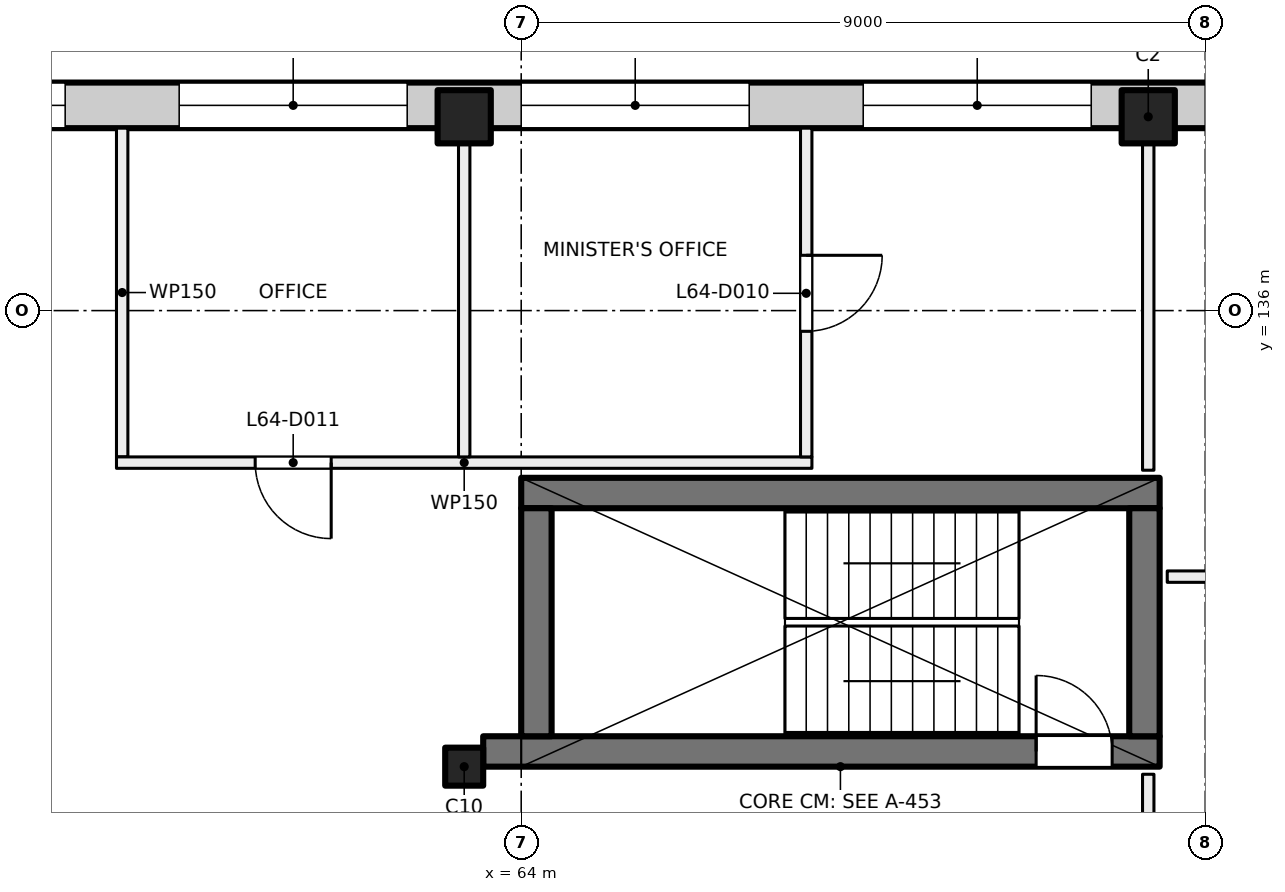
"""IFC4 building model, lengths in metres.
Left out: names, types, materials, properties, quantities, classifications, styles, units other than length and angle.
Written with IfcOpenShell. Run it as: python <this file> out.ifc"""

import sys

from ifc_helpers import new_model, si_unit, direction, frame, frame_2d, origin, origin_2d, place, context, subcontext, project, spatial, rectangle, extrude, element, fill, save


model = new_model("IFC4")
c1 = context("Model", 3, precision=1e-05, world=origin(), true_north=direction((0.0, 1.0)))
c2 = subcontext(c1, "Body", "Model", "MODEL_VIEW")
j1 = project(units=[si_unit("LENGTHUNIT", "METRE"), si_unit("PLANEANGLEUNIT", "RADIAN")], contexts=[c1])
p1 = place(None, origin())
s1 = spatial("IfcSite", under=j1, at=p1, CompositionType="ELEMENT")
p2 = place(p1, origin())
s2 = spatial("IfcBuilding", under=s1, at=p2, CompositionType="ELEMENT")
p3 = place(p2, frame((0.0, 0.0, 269.5)))
s3 = spatial("IfcBuildingStorey", under=s2, at=p3, CompositionType="ELEMENT", Elevation=269.5)
p4 = place(p3, frame((63.25, 130.0, 0.0), z_axis=(0.0, 0.0, 1.0), x_axis=(1.0, 0.0, 0.0)))
e1 = element("IfcColumn", 1, at=p4, inside=s3, PredefinedType="COLUMN", context=c2, shape_type="SweptSolid", body=[
    extrude(rectangle(XDim=0.5, YDim=0.5, at=origin_2d()), origin(), (0.0, 0.0, 1.0), 4.0),
])
for number, where, z_axis, x_axis in (
    (2, (63.25, 138.55, 0.0), (0.0, 0.0, 1.0), (1.0, 0.0, 0.0)),
    (3, (72.25, 138.55, 0.0), (0.0, 0.0, 1.0), (1.0, 0.0, 0.0)),
):
    element("IfcColumn", number, at=place(p3, frame(where, z_axis=z_axis, x_axis=x_axis)), inside=s3, PredefinedType="COLUMN", context=c2, shape_type="SweptSolid", body=[
        extrude(rectangle(XDim=0.7, YDim=0.7, at=origin_2d()), origin(), (0.0, 0.0, 1.0), 4.0),
    ])
p5 = place(p3, frame((63.5, 130.2, 0.0), z_axis=(0.0, 0.0, 1.0), x_axis=(1.0, 0.0, 0.0)))
e4 = element("IfcWall", 4, at=p5, inside=s3, PredefinedType="SHEAR", context=c2, shape_type="SweptSolid", body=[
    extrude(rectangle(XDim=8.9, YDim=0.4, at=frame_2d((4.45, 0.0))), origin(), (0.0, 0.0, 1.0), 4.0),
])
p6 = place(p5, frame((7.275, 0.0, 0.0)))
e5 = element("IfcOpeningElement", 5, at=p6, cuts=e4, PredefinedType="OPENING", context=c2, shape_type="SweptSolid", body=[
    extrude(rectangle(XDim=1.0, YDim=2.1, at=frame_2d((0.5, 1.05))), frame((0.0, 0.21, 0.0), z_axis=(0.0, -1.0, 0.0), x_axis=(1.0, 0.0, 0.0)), (0.0, 0.0, 1.0), 0.42),
])
p7 = place(p3, frame((64.0, 133.6, 0.0), z_axis=(0.0, 0.0, 1.0), x_axis=(1.0, 0.0, 0.0)))
e6 = element("IfcWall", 6, at=p7, inside=s3, PredefinedType="SHEAR", context=c2, shape_type="SweptSolid", body=[
    extrude(rectangle(XDim=8.4, YDim=0.4, at=frame_2d((4.2, 0.0))), origin(), (0.0, 0.0, 1.0), 4.0),
])
for number, where, z_axis, x_axis in (
    (7, (64.2, 130.4, 0.0), (0.0, 0.0, 1.0), (0.0, 1.0, 0.0)),
    (8, (72.2, 130.4, 0.0), (0.0, 0.0, 1.0), (0.0, 1.0, 0.0)),
):
    element("IfcWall", number, at=place(p3, frame(where, z_axis=z_axis, x_axis=x_axis)), inside=s3, PredefinedType="SHEAR", context=c2, shape_type="SweptSolid", body=[
        extrude(rectangle(XDim=3.0, YDim=0.4, at=frame_2d((1.5, 0.0))), origin(), (0.0, 0.0, 1.0), 4.0),
    ])
p8 = place(p3, frame((47.07, 138.7, 0.0), z_axis=(0.0, 0.0, 1.0), x_axis=(1.0, 0.0, 0.0)))
e9 = element("IfcWall", 9, at=p8, inside=s3, PredefinedType="SOLIDWALL", context=c2, shape_type="SweptSolid", body=[
    extrude(rectangle(XDim=43.91, YDim=0.6, at=frame_2d((21.955, 0.0))), origin(), (0.0, 0.0, 1.0), 3.625),
])
p9 = place(p8, frame((3.43, 0.0, 0.9)))
e10 = element("IfcOpeningElement", 10, at=p9, cuts=e9, PredefinedType="OPENING", context=c2, shape_type="SweptSolid", body=[
    extrude(rectangle(XDim=3.0, YDim=2.4, at=frame_2d((1.5, 1.2))), frame((0.0, 0.31, 0.0), z_axis=(0.0, -1.0, 0.0), x_axis=(1.0, 0.0, 0.0)), (0.0, 0.0, 1.0), 0.62),
])
p10 = place(p8, frame((7.93, 0.0, 0.9)))
e11 = element("IfcOpeningElement", 11, at=p10, cuts=e9, PredefinedType="OPENING", context=c2, shape_type="SweptSolid", body=[
    extrude(rectangle(XDim=3.0, YDim=2.4, at=frame_2d((1.5, 1.2))), frame((0.0, 0.31, 0.0), z_axis=(0.0, -1.0, 0.0), x_axis=(1.0, 0.0, 0.0)), (0.0, 0.0, 1.0), 0.62),
])
p11 = place(p8, frame((12.43, 0.0, 0.9)))
e12 = element("IfcOpeningElement", 12, at=p11, cuts=e9, PredefinedType="OPENING", context=c2, shape_type="SweptSolid", body=[
    extrude(rectangle(XDim=3.0, YDim=2.4, at=frame_2d((1.5, 1.2))), frame((0.0, 0.31, 0.0), z_axis=(0.0, -1.0, 0.0), x_axis=(1.0, 0.0, 0.0)), (0.0, 0.0, 1.0), 0.62),
])
p12 = place(p8, frame((16.93, 0.0, 0.9)))
e13 = element("IfcOpeningElement", 13, at=p12, cuts=e9, PredefinedType="OPENING", context=c2, shape_type="SweptSolid", body=[
    extrude(rectangle(XDim=3.0, YDim=2.4, at=frame_2d((1.5, 1.2))), frame((0.0, 0.31, 0.0), z_axis=(0.0, -1.0, 0.0), x_axis=(1.0, 0.0, 0.0)), (0.0, 0.0, 1.0), 0.62),
])
p13 = place(p8, frame((21.43, 0.0, 0.9)))
e14 = element("IfcOpeningElement", 14, at=p13, cuts=e9, PredefinedType="OPENING", context=c2, shape_type="SweptSolid", body=[
    extrude(rectangle(XDim=3.0, YDim=2.4, at=frame_2d((1.5, 1.2))), frame((0.0, 0.31, 0.0), z_axis=(0.0, -1.0, 0.0), x_axis=(1.0, 0.0, 0.0)), (0.0, 0.0, 1.0), 0.62),
])
p14 = place(p8, frame((25.93, 0.0, 0.9)))
e15 = element("IfcOpeningElement", 15, at=p14, cuts=e9, PredefinedType="OPENING", context=c2, shape_type="SweptSolid", body=[
    extrude(rectangle(XDim=3.0, YDim=2.4, at=frame_2d((1.5, 1.2))), frame((0.0, 0.31, 0.0), z_axis=(0.0, -1.0, 0.0), x_axis=(1.0, 0.0, 0.0)), (0.0, 0.0, 1.0), 0.62),
])
p15 = place(p8, frame((30.43, 0.0, 0.9)))
e16 = element("IfcOpeningElement", 16, at=p15, cuts=e9, PredefinedType="OPENING", context=c2, shape_type="SweptSolid", body=[
    extrude(rectangle(XDim=3.0, YDim=2.4, at=frame_2d((1.5, 1.2))), frame((0.0, 0.31, 0.0), z_axis=(0.0, -1.0, 0.0), x_axis=(1.0, 0.0, 0.0)), (0.0, 0.0, 1.0), 0.62),
])
p16 = place(p8, frame((34.93, 0.0, 0.9)))
e17 = element("IfcOpeningElement", 17, at=p16, cuts=e9, PredefinedType="OPENING", context=c2, shape_type="SweptSolid", body=[
    extrude(rectangle(XDim=3.0, YDim=2.4, at=frame_2d((1.5, 1.2))), frame((0.0, 0.31, 0.0), z_axis=(0.0, -1.0, 0.0), x_axis=(1.0, 0.0, 0.0)), (0.0, 0.0, 1.0), 0.62),
])
p17 = place(p8, frame((39.43, 0.0, 0.9)))
e18 = element("IfcOpeningElement", 18, at=p17, cuts=e9, PredefinedType="OPENING", context=c2, shape_type="SweptSolid", body=[
    extrude(rectangle(XDim=3.0, YDim=2.4, at=frame_2d((1.5, 1.2))), frame((0.0, 0.31, 0.0), z_axis=(0.0, -1.0, 0.0), x_axis=(1.0, 0.0, 0.0)), (0.0, 0.0, 1.0), 0.62),
])
p18 = place(p3, frame((58.75, 134.075, 0.0), z_axis=(0.0, 0.0, 1.0), x_axis=(0.0, 1.0, 0.0)))
e19 = element("IfcWall", 19, at=p18, inside=s3, PredefinedType="PARTITIONING", context=c2, shape_type="SweptSolid", body=[
    extrude(rectangle(XDim=4.325, YDim=0.15, at=frame_2d((2.163, 0.0))), origin(), (0.0, 0.0, 1.0), 3.625),
])
p19 = place(p3, frame((67.825, 134.0, 0.0), z_axis=(0.0, 0.0, 1.0), x_axis=(-1.0, 0.0, 0.0)))
e20 = element("IfcWall", 20, at=p19, inside=s3, PredefinedType="PARTITIONING", context=c2, shape_type="SweptSolid", body=[
    extrude(rectangle(XDim=9.15, YDim=0.15, at=frame_2d((4.575, 0.0))), origin(), (0.0, 0.0, 1.0), 3.625),
])
p20 = place(p19, frame((6.325, 0.0, 0.0)))
e21 = element("IfcOpeningElement", 21, at=p20, cuts=e20, PredefinedType="OPENING", context=c2, shape_type="SweptSolid", body=[
    extrude(rectangle(XDim=1.0, YDim=2.1, at=frame_2d((0.5, 1.05))), frame((0.0, 0.085, 0.0), z_axis=(0.0, -1.0, 0.0), x_axis=(1.0, 0.0, 0.0)), (0.0, 0.0, 1.0), 0.17),
])
p21 = place(p3, frame((63.25, 134.075, 0.0), z_axis=(0.0, 0.0, 1.0), x_axis=(0.0, 1.0, 0.0)))
e22 = element("IfcWall", 22, at=p21, inside=s3, PredefinedType="PARTITIONING", context=c2, shape_type="SweptSolid", body=[
    extrude(rectangle(XDim=4.325, YDim=0.15, at=frame_2d((2.163, 0.0))), origin(), (0.0, 0.0, 1.0), 3.625),
])
p22 = place(p3, frame((67.75, 138.4, 0.0), z_axis=(0.0, 0.0, 1.0), x_axis=(0.0, -1.0, 0.0)))
e23 = element("IfcWall", 23, at=p22, inside=s3, PredefinedType="PARTITIONING", context=c2, shape_type="SweptSolid", body=[
    extrude(rectangle(XDim=4.325, YDim=0.15, at=frame_2d((2.163, 0.0))), origin(), (0.0, 0.0, 1.0), 3.625),
])
p23 = place(p22, frame((1.673, 0.0, 0.0)))
e24 = element("IfcOpeningElement", 24, at=p23, cuts=e23, PredefinedType="OPENING", context=c2, shape_type="SweptSolid", body=[
    extrude(rectangle(XDim=1.0, YDim=2.1, at=frame_2d((0.5, 1.05))), frame((0.0, 0.085, 0.0), z_axis=(0.0, -1.0, 0.0), x_axis=(1.0, 0.0, 0.0)), (0.0, 0.0, 1.0), 0.17),
])
p24 = place(p3, frame((72.25, 126.0, 0.0), z_axis=(0.0, 0.0, 1.0), x_axis=(0.0, 1.0, 0.0)))
e25 = element("IfcWall", 25, at=p24, inside=s3, PredefinedType="PARTITIONING", context=c2, shape_type="SweptSolid", body=[
    extrude(rectangle(XDim=3.9, YDim=0.15, at=frame_2d((1.95, 0.0))), origin(), (0.0, 0.0, 1.0), 3.625),
])
p25 = place(p3, frame((72.25, 133.9, 0.0), z_axis=(0.0, 0.0, 1.0), x_axis=(0.0, 1.0, 0.0)))
e26 = element("IfcWall", 26, at=p25, inside=s3, PredefinedType="PARTITIONING", context=c2, shape_type="SweptSolid", body=[
    extrude(rectangle(XDim=4.5, YDim=0.15, at=frame_2d((2.25, 0.0))), origin(), (0.0, 0.0, 1.0), 3.625),
])
p26 = place(p3, frame((81.325, 132.5, 0.0), z_axis=(0.0, 0.0, 1.0), x_axis=(-1.0, 0.0, 0.0)))
e27 = element("IfcWall", 27, at=p26, inside=s3, PredefinedType="PARTITIONING", context=c2, shape_type="SweptSolid", body=[
    extrude(rectangle(XDim=8.825, YDim=0.15, at=frame_2d((4.413, 0.0))), origin(), (0.0, 0.0, 1.0), 3.625),
])
p27 = place(p26, frame((6.2, 0.0, 0.0)))
e28 = element("IfcOpeningElement", 28, at=p27, cuts=e27, PredefinedType="OPENING", context=c2, shape_type="SweptSolid", body=[
    extrude(rectangle(XDim=1.0, YDim=2.1, at=frame_2d((0.5, 1.05))), frame((0.0, 0.085, 0.0), z_axis=(0.0, -1.0, 0.0), x_axis=(1.0, 0.0, 0.0)), (0.0, 0.0, 1.0), 0.17),
])
p28 = place(p10, origin())
e29 = element("IfcWindow", 29, at=p28, inside=s3, PartitioningType="SINGLE_PANEL", PredefinedType="WINDOW", context=c2, shape_type="SweptSolid", body=[
    extrude(rectangle(XDim=3.0, YDim=2.4, at=frame_2d((1.5, 1.2))), frame((0.0, 0.03, 0.0), z_axis=(0.0, -1.0, 0.0), x_axis=(1.0, 0.0, 0.0)), (0.0, 0.0, 1.0), 0.06),
])
fill(e11, e29)
p29 = place(p11, origin())
e30 = element("IfcWindow", 30, at=p29, inside=s3, PartitioningType="SINGLE_PANEL", PredefinedType="WINDOW", context=c2, shape_type="SweptSolid", body=[
    extrude(rectangle(XDim=3.0, YDim=2.4, at=frame_2d((1.5, 1.2))), frame((0.0, 0.03, 0.0), z_axis=(0.0, -1.0, 0.0), x_axis=(1.0, 0.0, 0.0)), (0.0, 0.0, 1.0), 0.06),
])
fill(e12, e30)
p30 = place(p12, origin())
e31 = element("IfcWindow", 31, at=p30, inside=s3, PartitioningType="SINGLE_PANEL", PredefinedType="WINDOW", context=c2, shape_type="SweptSolid", body=[
    extrude(rectangle(XDim=3.0, YDim=2.4, at=frame_2d((1.5, 1.2))), frame((0.0, 0.03, 0.0), z_axis=(0.0, -1.0, 0.0), x_axis=(1.0, 0.0, 0.0)), (0.0, 0.0, 1.0), 0.06),
])
fill(e13, e31)
p31 = place(p13, origin())
e32 = element("IfcWindow", 32, at=p31, inside=s3, PartitioningType="SINGLE_PANEL", PredefinedType="WINDOW", context=c2, shape_type="SweptSolid", body=[
    extrude(rectangle(XDim=3.0, YDim=2.4, at=frame_2d((1.5, 1.2))), frame((0.0, 0.03, 0.0), z_axis=(0.0, -1.0, 0.0), x_axis=(1.0, 0.0, 0.0)), (0.0, 0.0, 1.0), 0.06),
])
fill(e14, e32)
p32 = place(p6, origin())
e33 = element("IfcDoor", 33, at=p32, inside=s3, OperationType="SINGLE_SWING_LEFT", PredefinedType="DOOR", context=c2, shape_type="SweptSolid", body=[
    extrude(rectangle(XDim=1.0, YDim=2.1, at=frame_2d((0.5, 1.05))), frame((0.0, 0.025, 0.0), z_axis=(0.0, -1.0, 0.0), x_axis=(1.0, 0.0, 0.0)), (0.0, 0.0, 1.0), 0.05),
])
fill(e5, e33)
p33 = place(p23, origin())
e34 = element("IfcDoor", 34, at=p33, inside=s3, OperationType="SINGLE_SWING_LEFT", PredefinedType="DOOR", context=c2, shape_type="SweptSolid", body=[
    extrude(rectangle(XDim=1.0, YDim=2.1, at=frame_2d((0.5, 1.05))), frame((0.0, 0.025, 0.0), z_axis=(0.0, -1.0, 0.0), x_axis=(1.0, 0.0, 0.0)), (0.0, 0.0, 1.0), 0.05),
])
fill(e24, e34)
p34 = place(p20, origin())
e35 = element("IfcDoor", 35, at=p34, inside=s3, OperationType="SINGLE_SWING_RIGHT", PredefinedType="DOOR", context=c2, shape_type="SweptSolid", body=[
    extrude(rectangle(XDim=1.0, YDim=2.1, at=frame_2d((0.5, 1.05))), frame((0.0, 0.025, 0.0), z_axis=(0.0, -1.0, 0.0), x_axis=(1.0, 0.0, 0.0)), (0.0, 0.0, 1.0), 0.05),
])
fill(e21, e35)
save(model, sys.argv[1])
